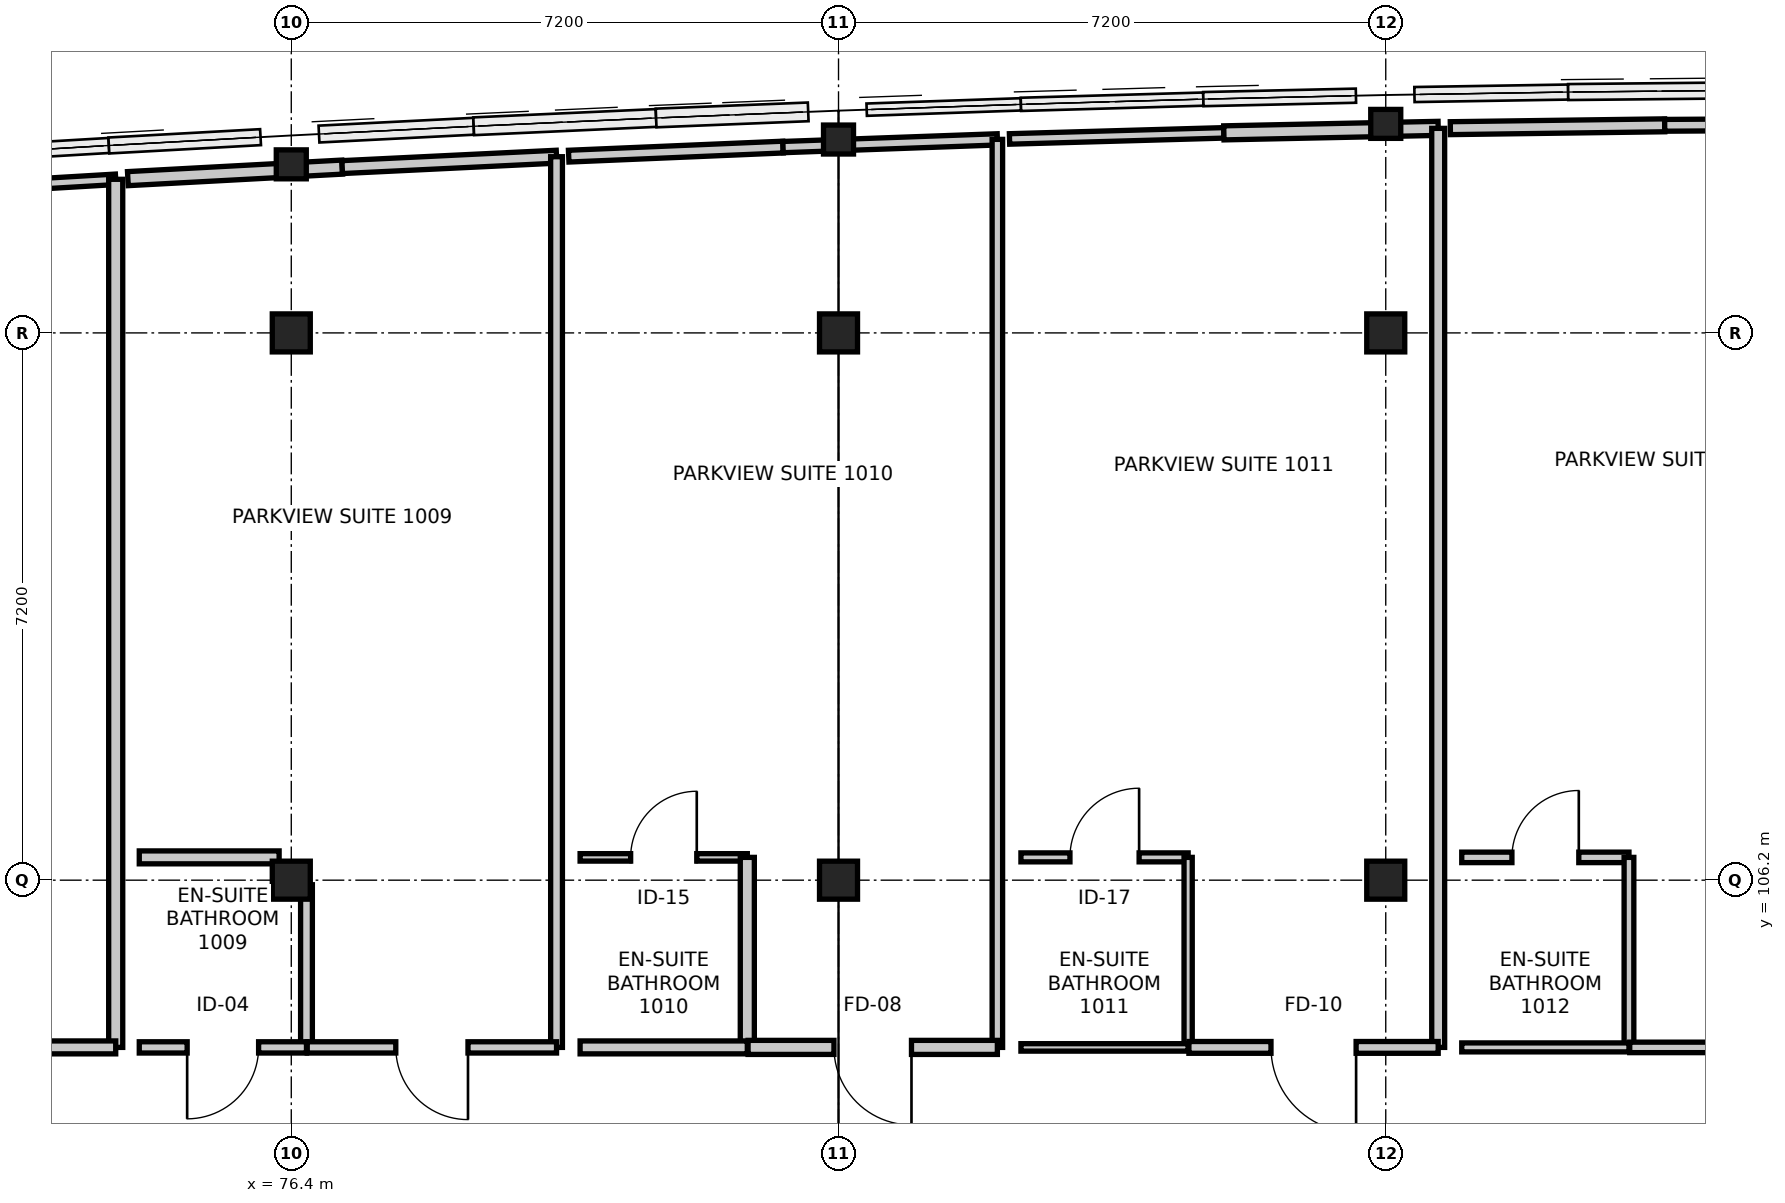
"""IFC4 building model, lengths in metres.
Left out: names, types, materials, properties, quantities, classifications, styles, units other than length and angle.
Written with IfcOpenShell. Run it as: python <this file> out.ifc"""

import sys

from ifc_helpers import new_model, si_unit, direction, frame, frame_2d, origin, origin_2d, place, context, subcontext, project, spatial, rectangle, i_section, extrude, element, fill, save


model = new_model("IFC4")
c1 = context("Model", 3, precision=1e-05, world=origin(), true_north=direction((0.0, 1.0)))
c2 = subcontext(c1, "Body", "Model", "MODEL_VIEW")
j1 = project(units=[si_unit("LENGTHUNIT", "METRE"), si_unit("PLANEANGLEUNIT", "RADIAN")], contexts=[c1])
p1 = place(None, origin())
s1 = spatial("IfcSite", under=j1, at=p1, CompositionType="ELEMENT")
p2 = place(p1, origin())
s2 = spatial("IfcBuilding", under=s1, at=p2, CompositionType="ELEMENT")
p3 = place(p2, frame((0.0, 0.0, 40.8)))
s3 = spatial("IfcBuildingStorey", under=s2, at=p3, CompositionType="ELEMENT", Elevation=40.8)
for number, where, z_axis, x_axis in (
    (1, (76.4, 106.2, 0.0), (0.0, 0.0, 1.0), (1.0, 0.0, 0.0)),
    (2, (76.4, 113.4, 0.0), (0.0, 0.0, 1.0), (1.0, 0.0, 0.0)),
):
    element("IfcColumn", number, at=place(p3, frame(where, z_axis=z_axis, x_axis=x_axis)), inside=s3, PredefinedType="COLUMN", context=c2, shape_type="SweptSolid", body=[
        extrude(rectangle(XDim=0.5, YDim=0.5, at=origin_2d()), origin(), (0.0, 0.0, 1.0), 3.6),
    ])
p4 = place(p3, frame((76.4, 115.618, 0.0), z_axis=(0.0, 0.0, 1.0), x_axis=(1.0, 0.0, 0.0)))
e3 = element("IfcColumn", 3, at=p4, inside=s3, PredefinedType="COLUMN", context=c2, shape_type="SweptSolid", body=[
    extrude(i_section(OverallWidth=0.395, OverallDepth=0.381, WebThickness=0.018, FlangeThickness=0.03, FilletRadius=0.015, at=origin_2d()), origin(), (0.0, 0.0, 1.0), 3.6),
])
for number, where, z_axis, x_axis in (
    (4, (83.6, 106.2, 0.0), (0.0, 0.0, 1.0), (1.0, 0.0, 0.0)),
    (5, (83.6, 113.4, 0.0), (0.0, 0.0, 1.0), (1.0, 0.0, 0.0)),
):
    element("IfcColumn", number, at=place(p3, frame(where, z_axis=z_axis, x_axis=x_axis)), inside=s3, PredefinedType="COLUMN", context=c2, shape_type="SweptSolid", body=[
        extrude(rectangle(XDim=0.5, YDim=0.5, at=origin_2d()), origin(), (0.0, 0.0, 1.0), 3.6),
    ])
p5 = place(p3, frame((83.6, 115.944, 0.0), z_axis=(0.0, 0.0, 1.0), x_axis=(1.0, 0.0, 0.0)))
e6 = element("IfcColumn", 6, at=p5, inside=s3, PredefinedType="COLUMN", context=c2, shape_type="SweptSolid", body=[
    extrude(i_section(OverallWidth=0.395, OverallDepth=0.381, WebThickness=0.018, FlangeThickness=0.03, FilletRadius=0.015, at=origin_2d()), origin(), (0.0, 0.0, 1.0), 3.6),
])
for number, where, z_axis, x_axis in (
    (7, (90.8, 106.2, 0.0), (0.0, 0.0, 1.0), (1.0, 0.0, 0.0)),
    (8, (90.8, 113.4, 0.0), (0.0, 0.0, 1.0), (1.0, 0.0, 0.0)),
):
    element("IfcColumn", number, at=place(p3, frame(where, z_axis=z_axis, x_axis=x_axis)), inside=s3, PredefinedType="COLUMN", context=c2, shape_type="SweptSolid", body=[
        extrude(rectangle(XDim=0.5, YDim=0.5, at=origin_2d()), origin(), (0.0, 0.0, 1.0), 3.6),
    ])
p6 = place(p3, frame((90.8, 116.15, 0.0), z_axis=(0.0, 0.0, 1.0), x_axis=(1.0, 0.0, 0.0)))
e9 = element("IfcColumn", 9, at=p6, inside=s3, PredefinedType="COLUMN", context=c2, shape_type="SweptSolid", body=[
    extrude(i_section(OverallWidth=0.395, OverallDepth=0.381, WebThickness=0.018, FlangeThickness=0.03, FilletRadius=0.015, at=origin_2d()), origin(), (0.0, 0.0, 1.0), 3.6),
])
p7 = place(p3, frame((71.27, 115.254, 0.0), z_axis=(0.0, 0.0, 1.0), x_axis=(0.998251350639, 0.059112104912, 0.0)))
e10 = element("IfcWall", 10, at=p7, inside=s3, PredefinedType="PARTITIONING", context=c2, shape_type="SweptSolid", body=[
    extrude(rectangle(XDim=2.825, YDim=0.138, at=frame_2d((1.413, 0.0))), origin(), (0.0, 0.0, 1.0), 2.956),
])
p8 = place(p3, frame((74.09, 115.421, 0.0), z_axis=(0.0, 0.0, 1.0), x_axis=(0.0, -1.0, 0.0)))
e11 = element("IfcWall", 11, at=p8, inside=s3, PredefinedType="PARTITIONING", context=c2, shape_type="SweptSolid", body=[
    extrude(rectangle(XDim=11.421, YDim=0.185, at=frame_2d((5.71, 0.0))), origin(), (0.0, 0.0, 1.0), 2.765),
])
p9 = place(p3, frame((74.09, 104.0, 0.0), z_axis=(0.0, 0.0, 1.0), x_axis=(-1.0, 0.0, 0.0)))
e12 = element("IfcWall", 12, at=p9, inside=s3, PredefinedType="PARTITIONING", context=c2, shape_type="SweptSolid", body=[
    extrude(rectangle(XDim=3.28, YDim=0.17, at=frame_2d((1.64, 0.0))), origin(), (0.0, 0.0, 1.0), 3.38),
])
p10 = place(p9, frame((1.11, 0.0, 0.0)))
e13 = element("IfcOpeningElement", 13, at=p10, cuts=e12, PredefinedType="OPENING", context=c2, shape_type="SweptSolid", body=[
    extrude(rectangle(XDim=1.06, YDim=2.2, at=frame_2d((0.53, 1.1))), frame((0.0, 0.095, 0.0), z_axis=(0.0, -1.0, 0.0), x_axis=(1.0, 0.0, 0.0)), (0.0, 0.0, 1.0), 0.19),
])
p11 = place(p3, frame((74.4, 106.5, 0.0), z_axis=(0.0, 0.0, 1.0), x_axis=(1.0, 0.0, 0.0)))
e14 = element("IfcWall", 14, at=p11, inside=s3, PredefinedType="PARTITIONING", context=c2, shape_type="SweptSolid", body=[
    extrude(rectangle(XDim=1.84, YDim=0.17, at=frame_2d((0.92, 0.0))), origin(), (0.0, 0.0, 1.0), 2.715),
])
p12 = place(p3, frame((76.6, 106.14, 0.0), z_axis=(0.0, 0.0, 1.0), x_axis=(0.0, -1.0, 0.0)))
e15 = element("IfcWall", 15, at=p12, inside=s3, PredefinedType="PARTITIONING", context=c2, shape_type="SweptSolid", body=[
    extrude(rectangle(XDim=2.14, YDim=0.155, at=frame_2d((1.07, 0.0))), origin(), (0.0, 0.0, 1.0), 2.715),
])
p13 = place(p3, frame((76.6, 104.0, 0.0), z_axis=(0.0, 0.0, 1.0), x_axis=(-1.0, 0.0, 0.0)))
e16 = element("IfcWall", 16, at=p13, inside=s3, PredefinedType="PARTITIONING", context=c2, shape_type="SweptSolid", body=[
    extrude(rectangle(XDim=2.2, YDim=0.148, at=frame_2d((1.1, 0.0))), origin(), (0.0, 0.0, 1.0), 2.715),
])
p14 = place(p13, frame((0.63, 0.0, 0.0)))
e17 = element("IfcOpeningElement", 17, at=p14, cuts=e16, PredefinedType="OPENING", context=c2, shape_type="SweptSolid", body=[
    extrude(rectangle(XDim=0.94, YDim=2.12, at=frame_2d((0.47, 1.06))), frame((0.0, 0.084, 0.0), z_axis=(0.0, -1.0, 0.0), x_axis=(1.0, 0.0, 0.0)), (0.0, 0.0, 1.0), 0.168),
])
p15 = place(p3, frame((74.25, 115.429, 0.0), z_axis=(0.0, 0.0, 1.0), x_axis=(0.998553333612, 0.053770251364, 0.0)))
e18 = element("IfcWall", 18, at=p15, inside=s3, PredefinedType="PARTITIONING", context=c2, shape_type="SweptSolid", body=[
    extrude(rectangle(XDim=2.824, YDim=0.185, at=frame_2d((1.412, 0.0))), origin(), (0.0, 0.0, 1.0), 2.956),
])
p16 = place(p3, frame((77.07, 115.581, 0.0), z_axis=(0.0, 0.0, 1.0), x_axis=(0.998826677996, 0.048427960145, 0.0)))
e19 = element("IfcWall", 19, at=p16, inside=s3, PredefinedType="PARTITIONING", context=c2, shape_type="SweptSolid", body=[
    extrude(rectangle(XDim=2.823, YDim=0.17, at=frame_2d((1.412, 0.0))), origin(), (0.0, 0.0, 1.0), 2.956),
])
p17 = place(p3, frame((79.89, 115.718, 0.0), z_axis=(0.0, 0.0, 1.0), x_axis=(0.0, -1.0, 0.0)))
e20 = element("IfcWall", 20, at=p17, inside=s3, PredefinedType="PARTITIONING", context=c2, shape_type="SweptSolid", body=[
    extrude(rectangle(XDim=11.718, YDim=0.155, at=frame_2d((5.859, 0.0))), origin(), (0.0, 0.0, 1.0), 2.765),
])
p18 = place(p3, frame((79.89, 104.0, 0.0), z_axis=(0.0, 0.0, 1.0), x_axis=(-1.0, 0.0, 0.0)))
e21 = element("IfcWall", 21, at=p18, inside=s3, PredefinedType="PARTITIONING", context=c2, shape_type="SweptSolid", body=[
    extrude(rectangle(XDim=3.28, YDim=0.148, at=frame_2d((1.64, 0.0))), origin(), (0.0, 0.0, 1.0), 2.715),
])
p19 = place(p18, frame((1.165, 0.0, 0.0)))
e22 = element("IfcOpeningElement", 22, at=p19, cuts=e21, PredefinedType="OPENING", context=c2, shape_type="SweptSolid", body=[
    extrude(rectangle(XDim=0.95, YDim=2.1, at=frame_2d((0.475, 1.05))), frame((0.0, 0.084, 0.0), z_axis=(0.0, -1.0, 0.0), x_axis=(1.0, 0.0, 0.0)), (0.0, 0.0, 1.0), 0.168),
])
p20 = place(p3, frame((80.2, 106.5, 0.0), z_axis=(0.0, 0.0, 1.0), x_axis=(1.0, 0.0, 0.0)))
e23 = element("IfcWall", 23, at=p20, inside=s3, PredefinedType="PARTITIONING", context=c2, shape_type="SweptSolid", body=[
    extrude(rectangle(XDim=2.2, YDim=0.098, at=frame_2d((1.1, 0.0))), origin(), (0.0, 0.0, 1.0), 3.38),
])
p21 = place(p20, frame((0.665, 0.0, 0.0)))
e24 = element("IfcOpeningElement", 24, at=p21, cuts=e23, PredefinedType="OPENING", context=c2, shape_type="SweptSolid", body=[
    extrude(rectangle(XDim=0.87, YDim=2.07, at=frame_2d((0.435, 1.035))), frame((0.0, 0.059, 0.0), z_axis=(0.0, -1.0, 0.0), x_axis=(1.0, 0.0, 0.0)), (0.0, 0.0, 1.0), 0.118),
])
p22 = place(p3, frame((82.4, 106.5, 0.0), z_axis=(0.0, 0.0, 1.0), x_axis=(0.0, -1.0, 0.0)))
e25 = element("IfcWall", 25, at=p22, inside=s3, PredefinedType="PARTITIONING", context=c2, shape_type="SweptSolid", body=[
    extrude(rectangle(XDim=2.5, YDim=0.185, at=frame_2d((1.25, 0.0))), origin(), (0.0, 0.0, 1.0), 2.765),
])
p23 = place(p3, frame((82.4, 104.0, 0.0), z_axis=(0.0, 0.0, 1.0), x_axis=(-1.0, 0.0, 0.0)))
e26 = element("IfcWall", 26, at=p23, inside=s3, PredefinedType="PARTITIONING", context=c2, shape_type="SweptSolid", body=[
    extrude(rectangle(XDim=2.2, YDim=0.17, at=frame_2d((1.1, 0.0))), origin(), (0.0, 0.0, 1.0), 3.38),
])
p24 = place(p3, frame((80.05, 115.725, 0.0), z_axis=(0.0, 0.0, 1.0), x_axis=(0.999105118999, 0.042296113167, 0.0)))
e27 = element("IfcWall", 27, at=p24, inside=s3, PredefinedType="PARTITIONING", context=c2, shape_type="SweptSolid", body=[
    extrude(rectangle(XDim=2.823, YDim=0.155, at=frame_2d((1.411, 0.0))), origin(), (0.0, 0.0, 1.0), 2.956),
])
p25 = place(p3, frame((82.87, 115.845, 0.0), z_axis=(0.0, 0.0, 1.0), x_axis=(0.999352006861, 0.035993977044, 0.0)))
e28 = element("IfcWall", 28, at=p25, inside=s3, PredefinedType="PARTITIONING", context=c2, shape_type="SweptSolid", body=[
    extrude(rectangle(XDim=2.822, YDim=0.148, at=frame_2d((1.411, 0.0))), origin(), (0.0, 0.0, 1.0), 2.956),
])
p26 = place(p3, frame((85.69, 115.946, 0.0), z_axis=(0.0, 0.0, 1.0), x_axis=(0.0, -1.0, 0.0)))
e29 = element("IfcWall", 29, at=p26, inside=s3, PredefinedType="PARTITIONING", context=c2, shape_type="SweptSolid", body=[
    extrude(rectangle(XDim=11.946, YDim=0.138, at=frame_2d((5.973, 0.0))), origin(), (0.0, 0.0, 1.0), 2.765),
])
p27 = place(p3, frame((85.69, 104.0, 0.0), z_axis=(0.0, 0.0, 1.0), x_axis=(-1.0, 0.0, 0.0)))
e30 = element("IfcWall", 30, at=p27, inside=s3, PredefinedType="PARTITIONING", context=c2, shape_type="SweptSolid", body=[
    extrude(rectangle(XDim=3.28, YDim=0.185, at=frame_2d((1.64, 0.0))), origin(), (0.0, 0.0, 1.0), 2.715),
])
p28 = place(p27, frame((1.13, 0.0, 0.0)))
e31 = element("IfcOpeningElement", 31, at=p28, cuts=e30, PredefinedType="OPENING", context=c2, shape_type="SweptSolid", body=[
    extrude(rectangle(XDim=1.02, YDim=2.15, at=frame_2d((0.51, 1.075))), frame((0.0, 0.103, 0.0), z_axis=(0.0, -1.0, 0.0), x_axis=(1.0, 0.0, 0.0)), (0.0, 0.0, 1.0), 0.205),
])
p29 = place(p3, frame((86.0, 106.5, 0.0), z_axis=(0.0, 0.0, 1.0), x_axis=(1.0, 0.0, 0.0)))
e32 = element("IfcWall", 32, at=p29, inside=s3, PredefinedType="PARTITIONING", context=c2, shape_type="SweptSolid", body=[
    extrude(rectangle(XDim=2.2, YDim=0.118, at=frame_2d((1.1, 0.0))), origin(), (0.0, 0.0, 1.0), 3.38),
])
p30 = place(p29, frame((0.645, 0.0, 0.0)))
e33 = element("IfcOpeningElement", 33, at=p30, cuts=e32, PredefinedType="OPENING", context=c2, shape_type="SweptSolid", body=[
    extrude(rectangle(XDim=0.91, YDim=2.11, at=frame_2d((0.455, 1.055))), frame((0.0, 0.069, 0.0), z_axis=(0.0, -1.0, 0.0), x_axis=(1.0, 0.0, 0.0)), (0.0, 0.0, 1.0), 0.138),
])
p31 = place(p3, frame((88.2, 106.5, 0.0), z_axis=(0.0, 0.0, 1.0), x_axis=(0.0, -1.0, 0.0)))
e34 = element("IfcWall", 34, at=p31, inside=s3, PredefinedType="PARTITIONING", context=c2, shape_type="SweptSolid", body=[
    extrude(rectangle(XDim=2.5, YDim=0.108, at=frame_2d((1.25, 0.0))), origin(), (0.0, 0.0, 1.0), 2.765),
])
p32 = place(p3, frame((88.2, 104.0, 0.0), z_axis=(0.0, 0.0, 1.0), x_axis=(-1.0, 0.0, 0.0)))
e35 = element("IfcWall", 35, at=p32, inside=s3, PredefinedType="PARTITIONING", context=c2, shape_type="SweptSolid", body=[
    extrude(rectangle(XDim=2.2, YDim=0.098, at=frame_2d((1.1, 0.0))), origin(), (0.0, 0.0, 1.0), 3.38),
])
p33 = place(p3, frame((85.85, 115.952, 0.0), z_axis=(0.0, 0.0, 1.0), x_axis=(0.999597012905, 0.028386824263, 0.0)))
e36 = element("IfcWall", 36, at=p33, inside=s3, PredefinedType="PARTITIONING", context=c2, shape_type="SweptSolid", body=[
    extrude(rectangle(XDim=2.821, YDim=0.138, at=frame_2d((1.411, 0.0))), origin(), (0.0, 0.0, 1.0), 2.956),
])
p34 = place(p3, frame((88.67, 116.032, 0.0), z_axis=(0.0, 0.0, 1.0), x_axis=(0.99978060909, 0.020945970686, 0.0)))
e37 = element("IfcWall", 37, at=p34, inside=s3, PredefinedType="PARTITIONING", context=c2, shape_type="SweptSolid", body=[
    extrude(rectangle(XDim=2.821, YDim=0.185, at=frame_2d((1.41, 0.0))), origin(), (0.0, 0.0, 1.0), 2.956),
])
p35 = place(p3, frame((91.49, 116.091, 0.0), z_axis=(0.0, 0.0, 1.0), x_axis=(0.0, -1.0, 0.0)))
e38 = element("IfcWall", 38, at=p35, inside=s3, PredefinedType="PARTITIONING", context=c2, shape_type="SweptSolid", body=[
    extrude(rectangle(XDim=12.091, YDim=0.17, at=frame_2d((6.045, 0.0))), origin(), (0.0, 0.0, 1.0), 2.765),
])
p36 = place(p3, frame((91.49, 104.0, 0.0), z_axis=(0.0, 0.0, 1.0), x_axis=(-1.0, 0.0, 0.0)))
e39 = element("IfcWall", 39, at=p36, inside=s3, PredefinedType="PARTITIONING", context=c2, shape_type="SweptSolid", body=[
    extrude(rectangle(XDim=3.28, YDim=0.155, at=frame_2d((1.64, 0.0))), origin(), (0.0, 0.0, 1.0), 2.715),
])
p37 = place(p36, frame((1.08, 0.0, 0.0)))
e40 = element("IfcOpeningElement", 40, at=p37, cuts=e39, PredefinedType="OPENING", context=c2, shape_type="SweptSolid", body=[
    extrude(rectangle(XDim=1.12, YDim=2.2, at=frame_2d((0.56, 1.1))), frame((0.0, 0.087, 0.0), z_axis=(0.0, -1.0, 0.0), x_axis=(1.0, 0.0, 0.0)), (0.0, 0.0, 1.0), 0.175),
])
p38 = place(p3, frame((91.8, 106.5, 0.0), z_axis=(0.0, 0.0, 1.0), x_axis=(1.0, 0.0, 0.0)))
e41 = element("IfcWall", 41, at=p38, inside=s3, PredefinedType="PARTITIONING", context=c2, shape_type="SweptSolid", body=[
    extrude(rectangle(XDim=2.2, YDim=0.138, at=frame_2d((1.1, 0.0))), origin(), (0.0, 0.0, 1.0), 3.38),
])
p39 = place(p38, frame((0.66, 0.0, 0.0)))
e42 = element("IfcOpeningElement", 42, at=p39, cuts=e41, PredefinedType="OPENING", context=c2, shape_type="SweptSolid", body=[
    extrude(rectangle(XDim=0.88, YDim=2.06, at=frame_2d((0.44, 1.03))), frame((0.0, 0.079, 0.0), z_axis=(0.0, -1.0, 0.0), x_axis=(1.0, 0.0, 0.0)), (0.0, 0.0, 1.0), 0.158),
])
p40 = place(p3, frame((94.0, 106.5, 0.0), z_axis=(0.0, 0.0, 1.0), x_axis=(0.0, -1.0, 0.0)))
e43 = element("IfcWall", 43, at=p40, inside=s3, PredefinedType="PARTITIONING", context=c2, shape_type="SweptSolid", body=[
    extrude(rectangle(XDim=2.5, YDim=0.128, at=frame_2d((1.25, 0.0))), origin(), (0.0, 0.0, 1.0), 2.765),
])
p41 = place(p3, frame((94.0, 104.0, 0.0), z_axis=(0.0, 0.0, 1.0), x_axis=(-1.0, 0.0, 0.0)))
e44 = element("IfcWall", 44, at=p41, inside=s3, PredefinedType="PARTITIONING", context=c2, shape_type="SweptSolid", body=[
    extrude(rectangle(XDim=2.2, YDim=0.118, at=frame_2d((1.1, 0.0))), origin(), (0.0, 0.0, 1.0), 3.38),
])
p42 = place(p3, frame((91.65, 116.094, 0.0), z_axis=(0.0, 0.0, 1.0), x_axis=(0.999911138347, 0.013330994313, 0.0)))
e45 = element("IfcWall", 45, at=p42, inside=s3, PredefinedType="PARTITIONING", context=c2, shape_type="SweptSolid", body=[
    extrude(rectangle(XDim=2.82, YDim=0.17, at=frame_2d((1.41, 0.0))), origin(), (0.0, 0.0, 1.0), 2.956),
])
p43 = place(p3, frame((94.47, 116.131, 0.0), z_axis=(0.0, 0.0, 1.0), x_axis=(0.999982672441, 0.00588683419, 0.0)))
e46 = element("IfcWall", 46, at=p43, inside=s3, PredefinedType="PARTITIONING", context=c2, shape_type="SweptSolid", body=[
    extrude(rectangle(XDim=2.82, YDim=0.155, at=frame_2d((1.41, 0.0))), origin(), (0.0, 0.0, 1.0), 2.956),
])
p44 = place(p3, frame((97.29, 104.0, 0.0), z_axis=(0.0, 0.0, 1.0), x_axis=(-1.0, 0.0, 0.0)))
e47 = element("IfcWall", 47, at=p44, inside=s3, PredefinedType="PARTITIONING", context=c2, shape_type="SweptSolid", body=[
    extrude(rectangle(XDim=3.28, YDim=0.138, at=frame_2d((1.64, 0.0))), origin(), (0.0, 0.0, 1.0), 3.38),
])
p45 = place(p44, frame((1.15, 0.0, 0.0)))
e48 = element("IfcOpeningElement", 48, at=p45, cuts=e47, PredefinedType="OPENING", context=c2, shape_type="SweptSolid", body=[
    extrude(rectangle(XDim=0.98, YDim=2.15, at=frame_2d((0.49, 1.075))), frame((0.0, 0.079, 0.0), z_axis=(0.0, -1.0, 0.0), x_axis=(1.0, 0.0, 0.0)), (0.0, 0.0, 1.0), 0.158),
])
p46 = place(p14, origin())
e49 = element("IfcDoor", 49, at=p46, inside=s3, OperationType="SINGLE_SWING_RIGHT", PredefinedType="DOOR", context=c2, shape_type="SweptSolid", body=[
    extrude(rectangle(XDim=0.94, YDim=2.12, at=frame_2d((0.47, 1.06))), frame((0.0, 0.025, 0.0), z_axis=(0.0, -1.0, 0.0), x_axis=(1.0, 0.0, 0.0)), (0.0, 0.0, 1.0), 0.05),
])
fill(e17, e49)
p47 = place(p19, origin())
e50 = element("IfcDoor", 50, at=p47, inside=s3, OperationType="SINGLE_SWING_LEFT", PredefinedType="DOOR", context=c2, shape_type="SweptSolid", body=[
    extrude(rectangle(XDim=0.95, YDim=2.1, at=frame_2d((0.475, 1.05))), frame((0.0, 0.025, 0.0), z_axis=(0.0, -1.0, 0.0), x_axis=(1.0, 0.0, 0.0)), (0.0, 0.0, 1.0), 0.05),
])
fill(e22, e50)
p48 = place(p21, origin())
e51 = element("IfcDoor", 51, at=p48, inside=s3, OperationType="SINGLE_SWING_RIGHT", PredefinedType="DOOR", context=c2, shape_type="SweptSolid", body=[
    extrude(rectangle(XDim=0.87, YDim=2.07, at=frame_2d((0.435, 1.035))), frame((0.0, 0.025, 0.0), z_axis=(0.0, -1.0, 0.0), x_axis=(1.0, 0.0, 0.0)), (0.0, 0.0, 1.0), 0.05),
])
fill(e24, e51)
p49 = place(p28, origin())
e52 = element("IfcDoor", 52, at=p49, inside=s3, OperationType="SINGLE_SWING_LEFT", PredefinedType="DOOR", context=c2, shape_type="SweptSolid", body=[
    extrude(rectangle(XDim=1.02, YDim=2.15, at=frame_2d((0.51, 1.075))), frame((0.0, 0.025, 0.0), z_axis=(0.0, -1.0, 0.0), x_axis=(1.0, 0.0, 0.0)), (0.0, 0.0, 1.0), 0.05),
])
fill(e31, e52)
p50 = place(p30, origin())
e53 = element("IfcDoor", 53, at=p50, inside=s3, OperationType="SINGLE_SWING_RIGHT", PredefinedType="DOOR", context=c2, shape_type="SweptSolid", body=[
    extrude(rectangle(XDim=0.91, YDim=2.11, at=frame_2d((0.455, 1.055))), frame((0.0, 0.025, 0.0), z_axis=(0.0, -1.0, 0.0), x_axis=(1.0, 0.0, 0.0)), (0.0, 0.0, 1.0), 0.05),
])
fill(e33, e53)
p51 = place(p37, origin())
e54 = element("IfcDoor", 54, at=p51, inside=s3, OperationType="SINGLE_SWING_LEFT", PredefinedType="DOOR", context=c2, shape_type="SweptSolid", body=[
    extrude(rectangle(XDim=1.12, YDim=2.2, at=frame_2d((0.56, 1.1))), frame((0.0, 0.025, 0.0), z_axis=(0.0, -1.0, 0.0), x_axis=(1.0, 0.0, 0.0)), (0.0, 0.0, 1.0), 0.05),
])
fill(e40, e54)
p52 = place(p39, origin())
e55 = element("IfcDoor", 55, at=p52, inside=s3, OperationType="SINGLE_SWING_RIGHT", PredefinedType="DOOR", context=c2, shape_type="SweptSolid", body=[
    extrude(rectangle(XDim=0.88, YDim=2.06, at=frame_2d((0.44, 1.03))), frame((0.0, 0.025, 0.0), z_axis=(0.0, -1.0, 0.0), x_axis=(1.0, 0.0, 0.0)), (0.0, 0.0, 1.0), 0.05),
])
fill(e42, e55)
save(model, sys.argv[1])
